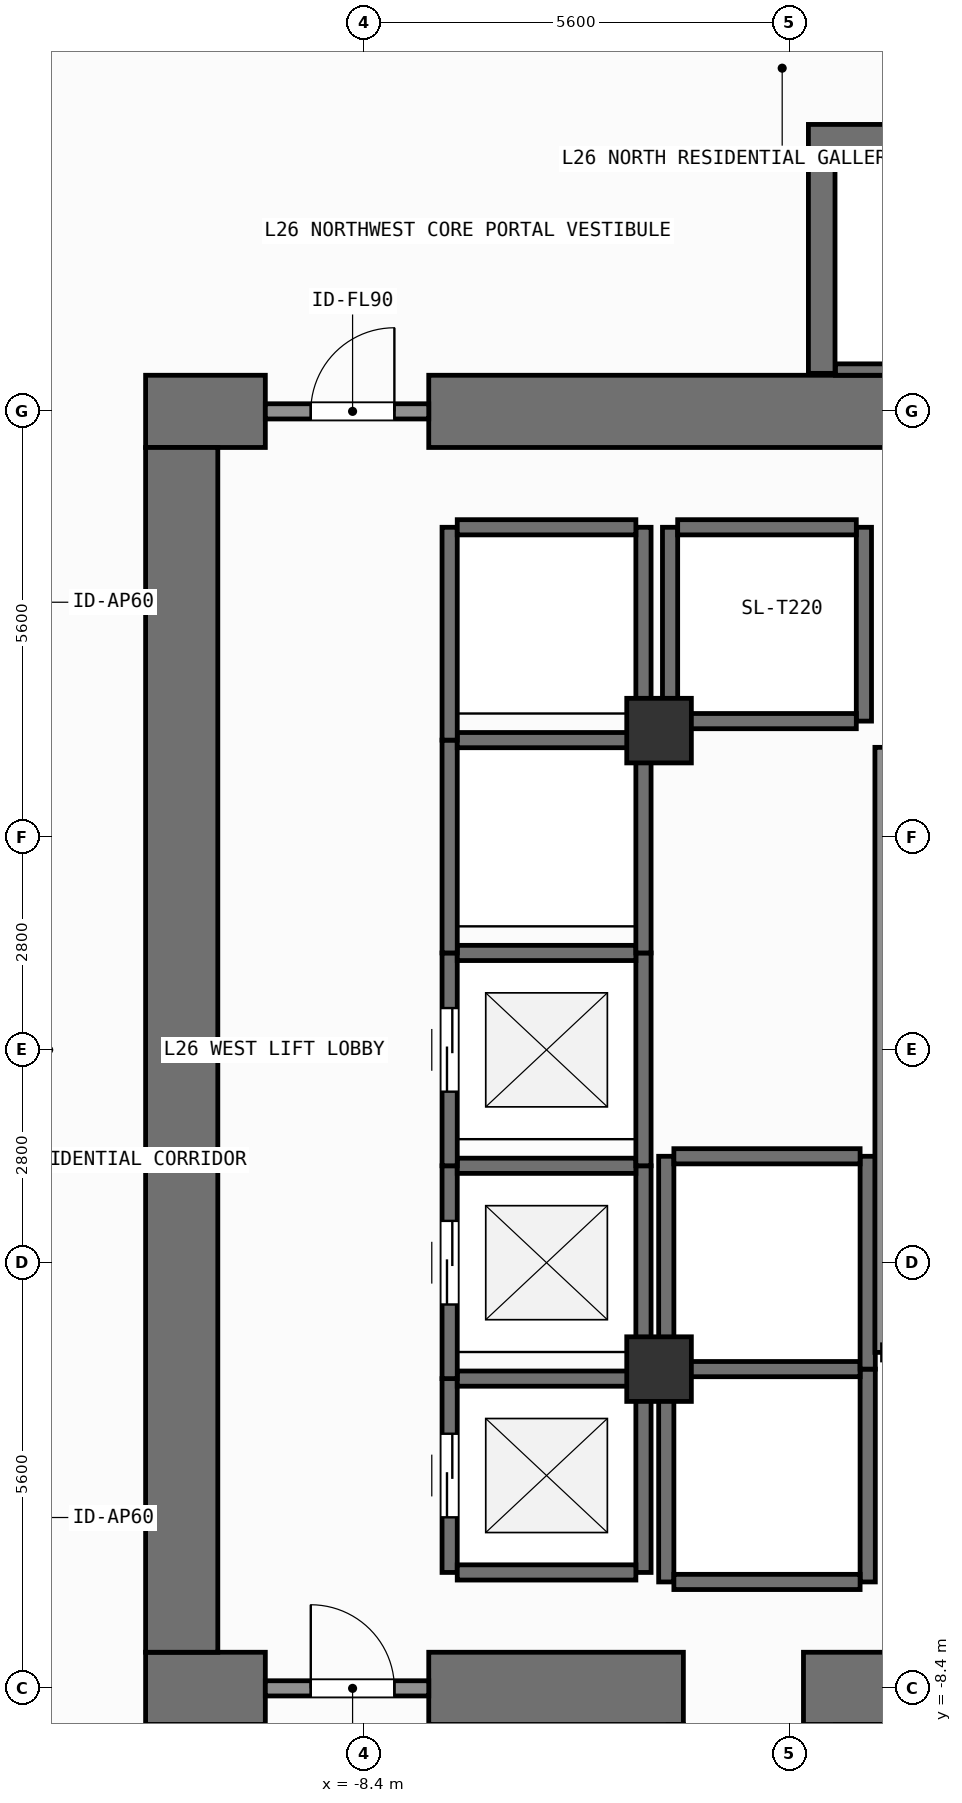
"""IFC4 building model, lengths in metres.
Left out: names, types, materials, properties, quantities, classifications, styles, units other than length and angle.
Written with IfcOpenShell. Run it as: python <this file> out.ifc"""

import sys

from ifc_helpers import new_model, si_unit, direction, frame, frame_2d, origin, origin_2d, place, context, subcontext, project, spatial, rectangle, extrude, element, fill, save


model = new_model("IFC4")
c1 = context("Model", 3, precision=1e-05, world=origin(), true_north=direction((0.0, 1.0)))
c2 = subcontext(c1, "Body", "Model", "MODEL_VIEW")
j1 = project(units=[si_unit("LENGTHUNIT", "METRE"), si_unit("PLANEANGLEUNIT", "RADIAN")], contexts=[c1])
p1 = place(None, origin())
s1 = spatial("IfcSite", under=j1, at=p1, CompositionType="ELEMENT")
p2 = place(p1, origin())
s2 = spatial("IfcBuilding", under=s1, at=p2, CompositionType="ELEMENT")
p3 = place(p2, frame((0.0, 0.0, 104.7)))
s3 = spatial("IfcBuildingStorey", under=s2, at=p3, CompositionType="ELEMENT", Elevation=104.7)
p4 = place(p3, frame((-11.275, -8.4, 0.0), z_axis=(0.0, 0.0, 1.0), x_axis=(1.0, 0.0, 0.0)))
e1 = element("IfcWall", 1, at=p4, inside=s3, PredefinedType="SHEAR", context=c2, shape_type="SweptSolid", body=[
    extrude(rectangle(XDim=1.575, YDim=0.95, at=frame_2d((0.788, 0.0))), origin(), (0.0, 0.0, 1.0), 3.9),
])
p5 = place(p3, frame((-7.55, -8.4, 0.0), z_axis=(0.0, 0.0, 1.0), x_axis=(1.0, 0.0, 0.0)))
e2 = element("IfcWall", 2, at=p5, inside=s3, PredefinedType="SHEAR", context=c2, shape_type="SweptSolid", body=[
    extrude(rectangle(XDim=3.35, YDim=0.95, at=frame_2d((1.675, 0.0))), origin(), (0.0, 0.0, 1.0), 3.9),
])
p6 = place(p3, frame((-2.62, -8.4, 0.0), z_axis=(0.0, 0.0, 1.0), x_axis=(1.0, 0.0, 0.0)))
e3 = element("IfcWall", 3, at=p6, inside=s3, PredefinedType="SHEAR", context=c2, shape_type="SweptSolid", body=[
    extrude(rectangle(XDim=7.27, YDim=0.95, at=frame_2d((3.635, 0.0))), origin(), (0.0, 0.0, 1.0), 3.9),
])
p7 = place(p3, frame((-11.275, 8.4, 0.0), z_axis=(0.0, 0.0, 1.0), x_axis=(1.0, 0.0, 0.0)))
e4 = element("IfcWall", 4, at=p7, inside=s3, PredefinedType="SHEAR", context=c2, shape_type="SweptSolid", body=[
    extrude(rectangle(XDim=1.575, YDim=0.95, at=frame_2d((0.788, 0.0))), origin(), (0.0, 0.0, 1.0), 3.9),
])
p8 = place(p3, frame((-7.55, 8.4, 0.0), z_axis=(0.0, 0.0, 1.0), x_axis=(1.0, 0.0, 0.0)))
e5 = element("IfcWall", 5, at=p8, inside=s3, PredefinedType="SHEAR", context=c2, shape_type="SweptSolid", body=[
    extrude(rectangle(XDim=16.425, YDim=0.95, at=frame_2d((8.212, 0.0))), origin(), (0.0, 0.0, 1.0), 3.9),
])
p9 = place(p3, frame((-10.8, -7.925, 0.0), z_axis=(0.0, 0.0, 1.0), x_axis=(0.0, 1.0, 0.0)))
e6 = element("IfcWall", 6, at=p9, inside=s3, PredefinedType="SHEAR", context=c2, shape_type="SweptSolid", body=[
    extrude(rectangle(XDim=15.85, YDim=0.95, at=frame_2d((7.925, 0.0))), origin(), (0.0, 0.0, 1.0), 3.9),
])
p10 = place(p3, frame((-2.555, 12.0, 0.0), z_axis=(0.0, 0.0, 1.0), x_axis=(1.0, 0.0, 0.0)))
e7 = element("IfcWall", 7, at=p10, inside=s3, PredefinedType="SHEAR", context=c2, shape_type="SweptSolid", body=[
    extrude(rectangle(XDim=7.31, YDim=0.35, at=frame_2d((3.655, 0.0))), origin(), (0.0, 0.0, 1.0), 3.9),
])
p11 = place(p3, frame((-2.2, 8.95, 0.0), z_axis=(0.0, 0.0, 1.0), x_axis=(1.0, 0.0, 0.0)))
e8 = element("IfcWall", 8, at=p11, inside=s3, PredefinedType="SHEAR", context=c2, shape_type="SweptSolid", body=[
    extrude(rectangle(XDim=6.6, YDim=0.15, at=frame_2d((3.3, 0.0))), origin(), (0.0, 0.0, 1.0), 3.9),
])
p12 = place(p3, frame((-2.38, 8.9, 0.0), z_axis=(0.0, 0.0, 1.0), x_axis=(0.0, 1.0, 0.0)))
e9 = element("IfcWall", 9, at=p12, inside=s3, PredefinedType="SHEAR", context=c2, shape_type="SweptSolid", body=[
    extrude(rectangle(XDim=2.925, YDim=0.35, at=frame_2d((1.462, 0.0))), origin(), (0.0, 0.0, 1.0), 3.9),
])
for number, where, z_axis, x_axis in (
    (10, (-4.52, -4.2, 0.0), (0.0, 0.0, 1.0), (1.0, 0.0, 0.0)),
    (11, (-4.52, 4.2, 0.0), (0.0, 0.0, 1.0), (1.0, 0.0, 0.0)),
):
    element("IfcColumn", number, at=place(p3, frame(where, z_axis=z_axis, x_axis=x_axis)), inside=s3, PredefinedType="COLUMN", context=c2, shape_type="SweptSolid", body=[
        extrude(rectangle(XDim=0.85, YDim=0.85, at=origin_2d()), origin(), (0.0, 0.0, 1.0), 3.9),
    ])
p13 = place(p3, frame((-7.275, -6.875, 0.0), z_axis=(0.0, 0.0, 1.0), x_axis=(0.0, 1.0, 0.0)))
e12 = element("IfcWall", 12, at=p13, inside=s3, PredefinedType="SHEAR", context=c2, shape_type="SweptSolid", body=[
    extrude(rectangle(XDim=2.55, YDim=0.2, at=frame_2d((1.275, 0.0))), origin(), (0.0, 0.0, 1.0), 3.62),
])
p14 = place(p13, frame((0.725, 0.0, 0.0)))
e13 = element("IfcOpeningElement", 13, at=p14, cuts=e12, PredefinedType="OPENING", context=c2, shape_type="SweptSolid", body=[
    extrude(rectangle(XDim=1.1, YDim=2.2, at=frame_2d((0.55, 1.1))), frame((0.0, 0.11, 0.0), z_axis=(0.0, -1.0, 0.0), x_axis=(1.0, 0.0, 0.0)), (0.0, 0.0, 1.0), 0.22),
])
p15 = place(p3, frame((-4.725, -6.875, 0.0), z_axis=(0.0, 0.0, 1.0), x_axis=(0.0, 1.0, 0.0)))
e14 = element("IfcWall", 14, at=p15, inside=s3, PredefinedType="SHEAR", context=c2, shape_type="SweptSolid", body=[
    extrude(rectangle(XDim=2.55, YDim=0.2, at=frame_2d((1.275, 0.0))), origin(), (0.0, 0.0, 1.0), 3.62),
])
for number, where, z_axis, x_axis in (
    (15, (-7.175, -6.875, 0.0), (0.0, 0.0, 1.0), (1.0, 0.0, 0.0)),
    (16, (-7.175, -4.325, 0.0), (0.0, 0.0, 1.0), (1.0, 0.0, 0.0)),
):
    element("IfcWall", number, at=place(p3, frame(where, z_axis=z_axis, x_axis=x_axis)), inside=s3, PredefinedType="SHEAR", context=c2, shape_type="SweptSolid", body=[
        extrude(rectangle(XDim=2.35, YDim=0.2, at=frame_2d((1.175, 0.0))), origin(), (0.0, 0.0, 1.0), 3.62),
    ])
p16 = place(p3, frame((-7.275, -4.325, 0.0), z_axis=(0.0, 0.0, 1.0), x_axis=(0.0, 1.0, 0.0)))
e17 = element("IfcWall", 17, at=p16, inside=s3, PredefinedType="SHEAR", context=c2, shape_type="SweptSolid", body=[
    extrude(rectangle(XDim=2.8, YDim=0.2, at=frame_2d((1.4, 0.0))), origin(), (0.0, 0.0, 1.0), 3.62),
])
p17 = place(p16, frame((0.975, 0.0, 0.0)))
e18 = element("IfcOpeningElement", 18, at=p17, cuts=e17, PredefinedType="OPENING", context=c2, shape_type="SweptSolid", body=[
    extrude(rectangle(XDim=1.1, YDim=2.2, at=frame_2d((0.55, 1.1))), frame((0.0, 0.11, 0.0), z_axis=(0.0, -1.0, 0.0), x_axis=(1.0, 0.0, 0.0)), (0.0, 0.0, 1.0), 0.22),
])
p18 = place(p3, frame((-4.725, -4.325, 0.0), z_axis=(0.0, 0.0, 1.0), x_axis=(0.0, 1.0, 0.0)))
e19 = element("IfcWall", 19, at=p18, inside=s3, PredefinedType="SHEAR", context=c2, shape_type="SweptSolid", body=[
    extrude(rectangle(XDim=2.8, YDim=0.2, at=frame_2d((1.4, 0.0))), origin(), (0.0, 0.0, 1.0), 3.62),
])
p19 = place(p3, frame((-7.175, -1.525, 0.0), z_axis=(0.0, 0.0, 1.0), x_axis=(1.0, 0.0, 0.0)))
e20 = element("IfcWall", 20, at=p19, inside=s3, PredefinedType="SHEAR", context=c2, shape_type="SweptSolid", body=[
    extrude(rectangle(XDim=2.35, YDim=0.2, at=frame_2d((1.175, 0.0))), origin(), (0.0, 0.0, 1.0), 3.62),
])
p20 = place(p3, frame((-7.275, -1.525, 0.0), z_axis=(0.0, 0.0, 1.0), x_axis=(0.0, 1.0, 0.0)))
e21 = element("IfcWall", 21, at=p20, inside=s3, PredefinedType="SHEAR", context=c2, shape_type="SweptSolid", body=[
    extrude(rectangle(XDim=2.8, YDim=0.2, at=frame_2d((1.4, 0.0))), origin(), (0.0, 0.0, 1.0), 3.62),
])
p21 = place(p20, frame((0.975, 0.0, 0.0)))
e22 = element("IfcOpeningElement", 22, at=p21, cuts=e21, PredefinedType="OPENING", context=c2, shape_type="SweptSolid", body=[
    extrude(rectangle(XDim=1.1, YDim=2.2, at=frame_2d((0.55, 1.1))), frame((0.0, 0.11, 0.0), z_axis=(0.0, -1.0, 0.0), x_axis=(1.0, 0.0, 0.0)), (0.0, 0.0, 1.0), 0.22),
])
p22 = place(p3, frame((-4.725, -1.525, 0.0), z_axis=(0.0, 0.0, 1.0), x_axis=(0.0, 1.0, 0.0)))
e23 = element("IfcWall", 23, at=p22, inside=s3, PredefinedType="SHEAR", context=c2, shape_type="SweptSolid", body=[
    extrude(rectangle(XDim=2.8, YDim=0.2, at=frame_2d((1.4, 0.0))), origin(), (0.0, 0.0, 1.0), 3.62),
])
p23 = place(p3, frame((-7.175, 1.275, 0.0), z_axis=(0.0, 0.0, 1.0), x_axis=(1.0, 0.0, 0.0)))
e24 = element("IfcWall", 24, at=p23, inside=s3, PredefinedType="SHEAR", context=c2, shape_type="SweptSolid", body=[
    extrude(rectangle(XDim=2.35, YDim=0.2, at=frame_2d((1.175, 0.0))), origin(), (0.0, 0.0, 1.0), 3.62),
])
for number, where, z_axis, x_axis in (
    (25, (-7.275, 1.275, 0.0), (0.0, 0.0, 1.0), (0.0, 1.0, 0.0)),
    (26, (-4.725, 1.275, 0.0), (0.0, 0.0, 1.0), (0.0, 1.0, 0.0)),
):
    element("IfcWall", number, at=place(p3, frame(where, z_axis=z_axis, x_axis=x_axis)), inside=s3, PredefinedType="SHEAR", context=c2, shape_type="SweptSolid", body=[
        extrude(rectangle(XDim=2.8, YDim=0.2, at=frame_2d((1.4, 0.0))), origin(), (0.0, 0.0, 1.0), 3.62),
    ])
p24 = place(p3, frame((-7.175, 4.075, 0.0), z_axis=(0.0, 0.0, 1.0), x_axis=(1.0, 0.0, 0.0)))
e27 = element("IfcWall", 27, at=p24, inside=s3, PredefinedType="SHEAR", context=c2, shape_type="SweptSolid", body=[
    extrude(rectangle(XDim=2.35, YDim=0.2, at=frame_2d((1.175, 0.0))), origin(), (0.0, 0.0, 1.0), 3.62),
])
for number, where, z_axis, x_axis in (
    (28, (-7.275, 4.075, 0.0), (0.0, 0.0, 1.0), (0.0, 1.0, 0.0)),
    (29, (-4.725, 4.075, 0.0), (0.0, 0.0, 1.0), (0.0, 1.0, 0.0)),
):
    element("IfcWall", number, at=place(p3, frame(where, z_axis=z_axis, x_axis=x_axis)), inside=s3, PredefinedType="SHEAR", context=c2, shape_type="SweptSolid", body=[
        extrude(rectangle(XDim=2.8, YDim=0.2, at=frame_2d((1.4, 0.0))), origin(), (0.0, 0.0, 1.0), 3.62),
    ])
p25 = place(p3, frame((-7.175, 6.875, 0.0), z_axis=(0.0, 0.0, 1.0), x_axis=(1.0, 0.0, 0.0)))
e30 = element("IfcWall", 30, at=p25, inside=s3, PredefinedType="SHEAR", context=c2, shape_type="SweptSolid", body=[
    extrude(rectangle(XDim=2.35, YDim=0.2, at=frame_2d((1.175, 0.0))), origin(), (0.0, 0.0, 1.0), 3.62),
])
for number, where, z_axis, x_axis in (
    (31, (-4.375, 4.325, 0.0), (0.0, 0.0, 1.0), (0.0, 1.0, 0.0)),
    (32, (-1.825, 4.325, 0.0), (0.0, 0.0, 1.0), (0.0, 1.0, 0.0)),
):
    element("IfcWall", number, at=place(p3, frame(where, z_axis=z_axis, x_axis=x_axis)), inside=s3, PredefinedType="SHEAR", context=c2, shape_type="SweptSolid", body=[
        extrude(rectangle(XDim=2.55, YDim=0.2, at=frame_2d((1.275, 0.0))), origin(), (0.0, 0.0, 1.0), 3.62),
    ])
for number, where, z_axis, x_axis in (
    (33, (-4.275, 4.325, 0.0), (0.0, 0.0, 1.0), (1.0, 0.0, 0.0)),
    (34, (-4.275, 6.875, 0.0), (0.0, 0.0, 1.0), (1.0, 0.0, 0.0)),
):
    element("IfcWall", number, at=place(p3, frame(where, z_axis=z_axis, x_axis=x_axis)), inside=s3, PredefinedType="SHEAR", context=c2, shape_type="SweptSolid", body=[
        extrude(rectangle(XDim=2.35, YDim=0.2, at=frame_2d((1.175, 0.0))), origin(), (0.0, 0.0, 1.0), 3.62),
    ])
for number, where, z_axis, x_axis in (
    (35, (-4.425, -7.0, 0.0), (0.0, 0.0, 1.0), (0.0, 1.0, 0.0)),
    (36, (-1.775, -7.0, 0.0), (0.0, 0.0, 1.0), (0.0, 1.0, 0.0)),
):
    element("IfcWall", number, at=place(p3, frame(where, z_axis=z_axis, x_axis=x_axis)), inside=s3, PredefinedType="SHEAR", context=c2, shape_type="SweptSolid", body=[
        extrude(rectangle(XDim=2.8, YDim=0.2, at=frame_2d((1.4, 0.0))), origin(), (0.0, 0.0, 1.0), 3.62),
    ])
for number, where, z_axis, x_axis in (
    (37, (-4.325, -7.0, 0.0), (0.0, 0.0, 1.0), (1.0, 0.0, 0.0)),
    (38, (-4.325, -4.2, 0.0), (0.0, 0.0, 1.0), (1.0, 0.0, 0.0)),
):
    element("IfcWall", number, at=place(p3, frame(where, z_axis=z_axis, x_axis=x_axis)), inside=s3, PredefinedType="SHEAR", context=c2, shape_type="SweptSolid", body=[
        extrude(rectangle(XDim=2.45, YDim=0.2, at=frame_2d((1.225, 0.0))), origin(), (0.0, 0.0, 1.0), 3.62),
    ])
for number, where, z_axis, x_axis in (
    (39, (-4.425, -4.2, 0.0), (0.0, 0.0, 1.0), (0.0, 1.0, 0.0)),
    (40, (-1.775, -4.2, 0.0), (0.0, 0.0, 1.0), (0.0, 1.0, 0.0)),
):
    element("IfcWall", number, at=place(p3, frame(where, z_axis=z_axis, x_axis=x_axis)), inside=s3, PredefinedType="SHEAR", context=c2, shape_type="SweptSolid", body=[
        extrude(rectangle(XDim=2.8, YDim=0.2, at=frame_2d((1.4, 0.0))), origin(), (0.0, 0.0, 1.0), 3.62),
    ])
p26 = place(p3, frame((-4.325, -1.4, 0.0), z_axis=(0.0, 0.0, 1.0), x_axis=(1.0, 0.0, 0.0)))
e41 = element("IfcWall", 41, at=p26, inside=s3, PredefinedType="SHEAR", context=c2, shape_type="SweptSolid", body=[
    extrude(rectangle(XDim=2.45, YDim=0.2, at=frame_2d((1.225, 0.0))), origin(), (0.0, 0.0, 1.0), 3.62),
])
p27 = place(p3, frame((-9.7, -8.4, 0.0), z_axis=(0.0, 0.0, 1.0), x_axis=(1.0, 0.0, 0.0)))
e42 = element("IfcWall", 42, at=p27, inside=s3, PredefinedType="SOLIDWALL", context=c2, shape_type="SweptSolid", body=[
    extrude(rectangle(XDim=2.15, YDim=0.2, at=frame_2d((1.075, 0.0))), origin(), (0.0, 0.0, 1.0), 2.66),
])
p28 = place(p27, frame((0.598, 0.0, 0.0)))
e43 = element("IfcOpeningElement", 43, at=p28, cuts=e42, PredefinedType="OPENING", context=c2, shape_type="SweptSolid", body=[
    extrude(rectangle(XDim=1.1, YDim=2.15, at=frame_2d((0.55, 1.075))), frame((0.0, 0.11, 0.0), z_axis=(0.0, -1.0, 0.0), x_axis=(1.0, 0.0, 0.0)), (0.0, 0.0, 1.0), 0.22),
])
p29 = place(p3, frame((-9.7, 8.4, 0.0), z_axis=(0.0, 0.0, 1.0), x_axis=(1.0, 0.0, 0.0)))
e44 = element("IfcWall", 44, at=p29, inside=s3, PredefinedType="SOLIDWALL", context=c2, shape_type="SweptSolid", body=[
    extrude(rectangle(XDim=2.15, YDim=0.2, at=frame_2d((1.075, 0.0))), origin(), (0.0, 0.0, 1.0), 2.66),
])
p30 = place(p29, frame((0.598, 0.0, 0.0)))
e45 = element("IfcOpeningElement", 45, at=p30, cuts=e44, PredefinedType="OPENING", context=c2, shape_type="SweptSolid", body=[
    extrude(rectangle(XDim=1.1, YDim=2.15, at=frame_2d((0.55, 1.075))), frame((0.0, 0.11, 0.0), z_axis=(0.0, -1.0, 0.0), x_axis=(1.0, 0.0, 0.0)), (0.0, 0.0, 1.0), 0.22),
])
p31 = place(p3, frame((-1.58, -3.98, 0.0), z_axis=(0.0, 0.0, 1.0), x_axis=(0.0, 1.0, 0.0)))
e46 = element("IfcWall", 46, at=p31, inside=s3, PredefinedType="SOLIDWALL", context=c2, shape_type="SweptSolid", body=[
    extrude(rectangle(XDim=7.96, YDim=0.2, at=frame_2d((3.98, 0.0))), origin(), (0.0, 0.0, 1.0), 3.62),
])
p32 = place(p14, origin())
e47 = element("IfcDoor", 47, at=p32, inside=s3, OperationType="SLIDING_TO_LEFT", PredefinedType="DOOR", context=c2, shape_type="SweptSolid", body=[
    extrude(rectangle(XDim=1.1, YDim=2.2, at=frame_2d((0.55, 1.1))), frame((0.0, 0.025, 0.0), z_axis=(0.0, -1.0, 0.0), x_axis=(1.0, 0.0, 0.0)), (0.0, 0.0, 1.0), 0.05),
])
fill(e13, e47)
p33 = place(p17, origin())
e48 = element("IfcDoor", 48, at=p33, inside=s3, OperationType="SLIDING_TO_LEFT", PredefinedType="DOOR", context=c2, shape_type="SweptSolid", body=[
    extrude(rectangle(XDim=1.1, YDim=2.2, at=frame_2d((0.55, 1.1))), frame((0.0, 0.025, 0.0), z_axis=(0.0, -1.0, 0.0), x_axis=(1.0, 0.0, 0.0)), (0.0, 0.0, 1.0), 0.05),
])
fill(e18, e48)
p34 = place(p21, origin())
e49 = element("IfcDoor", 49, at=p34, inside=s3, OperationType="SLIDING_TO_LEFT", PredefinedType="DOOR", context=c2, shape_type="SweptSolid", body=[
    extrude(rectangle(XDim=1.1, YDim=2.2, at=frame_2d((0.55, 1.1))), frame((0.0, 0.025, 0.0), z_axis=(0.0, -1.0, 0.0), x_axis=(1.0, 0.0, 0.0)), (0.0, 0.0, 1.0), 0.05),
])
fill(e22, e49)
p35 = place(p28, origin())
e50 = element("IfcDoor", 50, at=p35, inside=s3, OperationType="SINGLE_SWING_LEFT", PredefinedType="DOOR", context=c2, shape_type="SweptSolid", body=[
    extrude(rectangle(XDim=1.1, YDim=2.15, at=frame_2d((0.55, 1.075))), frame((0.0, 0.025, 0.0), z_axis=(0.0, -1.0, 0.0), x_axis=(1.0, 0.0, 0.0)), (0.0, 0.0, 1.0), 0.05),
])
fill(e43, e50)
p36 = place(p30, origin())
e51 = element("IfcDoor", 51, at=p36, inside=s3, OperationType="SINGLE_SWING_RIGHT", PredefinedType="DOOR", context=c2, shape_type="SweptSolid", body=[
    extrude(rectangle(XDim=1.1, YDim=2.15, at=frame_2d((0.55, 1.075))), frame((0.0, 0.025, 0.0), z_axis=(0.0, -1.0, 0.0), x_axis=(1.0, 0.0, 0.0)), (0.0, 0.0, 1.0), 0.05),
])
fill(e45, e51)
save(model, sys.argv[1])
